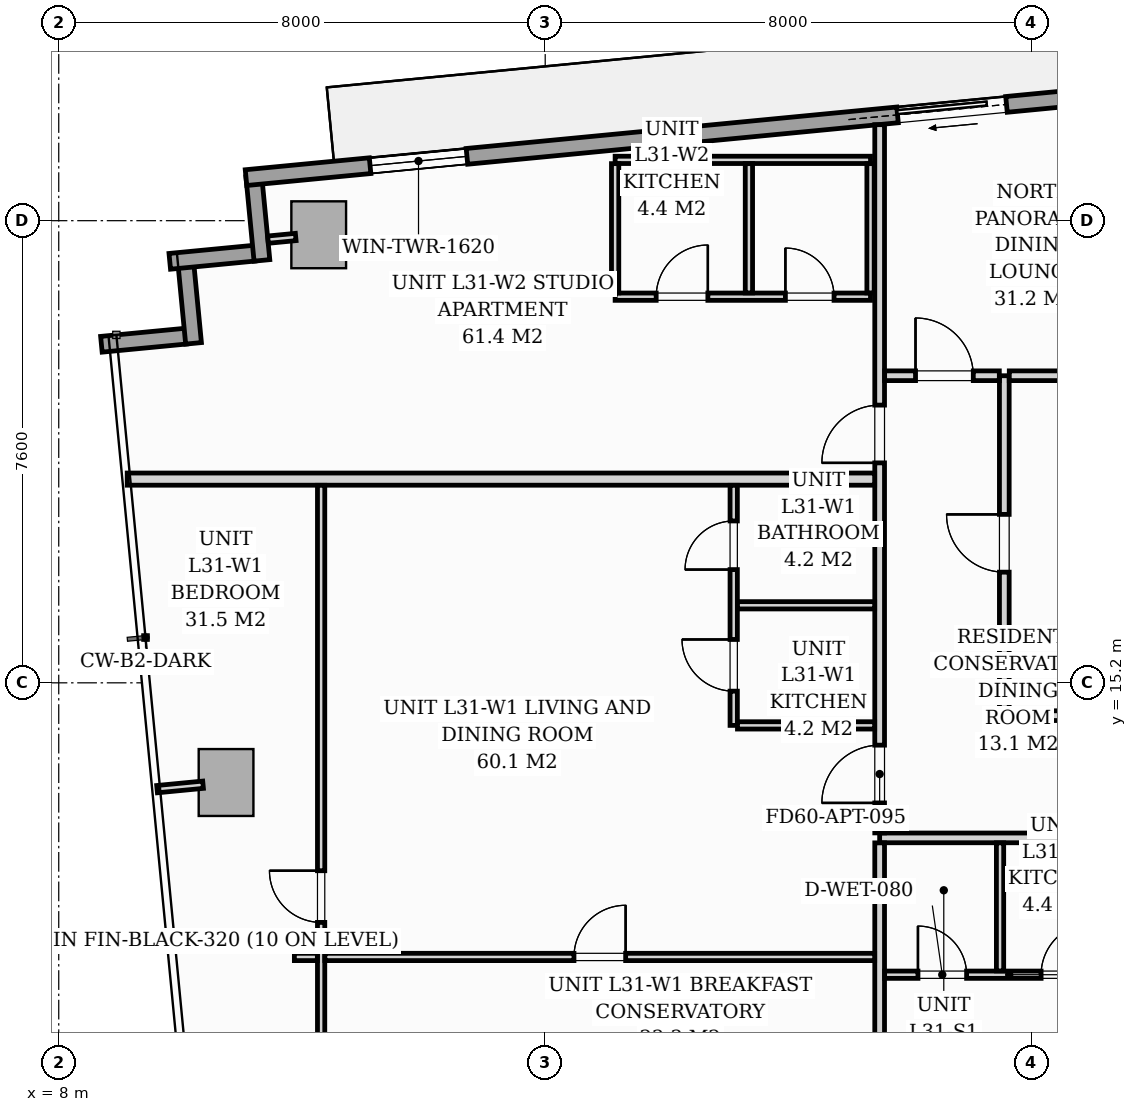
"""IFC4 building model, lengths in metres.
Left out: names, types, materials, properties, quantities, classifications, styles, units other than length and angle.
Written with IfcOpenShell. Run it as: python <this file> out.ifc"""

import sys

from ifc_helpers import new_model, si_unit, direction, frame, frame_2d, origin, origin_2d, place, context, subcontext, project, spatial, rectangle, extrude, source, transform, mapped, element, fill, save


model = new_model("IFC4")
c1 = context("Model", 3, precision=1e-05, world=origin(), true_north=direction((0.0, 1.0)))
c2 = subcontext(c1, "Body", "Model", "MODEL_VIEW")
j1 = project(units=[si_unit("LENGTHUNIT", "METRE"), si_unit("PLANEANGLEUNIT", "RADIAN")], contexts=[c1])
p1 = place(None, origin())
s1 = spatial("IfcSite", under=j1, at=p1, CompositionType="ELEMENT")
p2 = place(p1, origin())
s2 = spatial("IfcBuilding", under=s1, at=p2, CompositionType="ELEMENT")
p3 = place(p2, frame((0.0, 0.0, 109.8)))
s3 = spatial("IfcBuildingStorey", under=s2, at=p3, CompositionType="ELEMENT", Elevation=109.8)
m1 = source(origin(), c2, "Body", "SweptSolid", [
    extrude(rectangle(XDim=0.9, YDim=1.1, at=origin_2d()), origin(), (0.0, 0.0, 1.0), 3.196),
])
for number, where, z_axis, x_axis in (
    (1, (12.275, 22.568, 0.002), (0.0, 0.0, 1.0), (0.995, 0.096, 0.0)),
    (2, (10.752, 13.561, 0.002), (0.0, 0.0, 1.0), (0.995, 0.096, 0.0)),
):
    element("IfcColumn", number, at=place(p3, frame(where, z_axis=z_axis, x_axis=x_axis)), inside=s3, PredefinedType="COLUMN", context=c2, shape_type="MappedRepresentation", body=[
        mapped(m1, transform((0.0, 0.0, 0.0), scale=1.0)),
    ])
for number, where, z_axis, x_axis in (
    (3, (8.701, 20.767, 0.0), (0.0, 0.0, 1.0), (0.995, 0.096, 0.0)),
    (4, (10.217, 20.783, 0.0), (0.0, 0.0, 1.0), (-0.096, 0.995, 0.0)),
):
    element("IfcWall", number, at=place(p3, frame(where, z_axis=z_axis, x_axis=x_axis)), inside=s3, PredefinedType="STANDARD", context=c2, shape_type="SweptSolid", body=[
        extrude(rectangle(XDim=1.395, YDim=0.26, at=frame_2d((0.698, 0.0))), origin(), (0.0, 0.0, 1.0), 2.94),
    ])
p4 = place(p3, frame((9.826, 22.131, 0.0), z_axis=(0.0, 0.0, 1.0), x_axis=(0.995389446633, 0.095915846097, 0.0)))
e5 = element("IfcWall", 5, at=p4, inside=s3, PredefinedType="STANDARD", context=c2, shape_type="SweptSolid", body=[
    extrude(rectangle(XDim=1.395, YDim=0.26, at=frame_2d((0.697, 0.0))), origin(), (0.0, 0.0, 1.0), 2.94),
])
p5 = place(p3, frame((11.341, 22.147, 0.0), z_axis=(0.0, 0.0, 1.0), x_axis=(-0.09589913835, 0.995391056452, 0.0)))
e6 = element("IfcWall", 6, at=p5, inside=s3, PredefinedType="STANDARD", context=c2, shape_type="SweptSolid", body=[
    extrude(rectangle(XDim=1.395, YDim=0.26, at=frame_2d((0.698, 0.0))), origin(), (0.0, 0.0, 1.0), 2.94),
])
p6 = place(p3, frame((11.08, 23.508, 0.0), z_axis=(0.0, 0.0, 1.0), x_axis=(0.995396638587, 0.095841180552, 0.0)))
e7 = element("IfcWall", 7, at=p6, inside=s3, PredefinedType="STANDARD", context=c2, shape_type="SweptSolid", body=[
    extrude(rectangle(XDim=19.11, YDim=0.26, at=frame_2d((9.555, 0.0))), origin(), (0.0, 0.0, 1.0), 2.94),
])
p7 = place(p6, frame((10.764, 0.0, 0.0)))
e8 = element("IfcOpeningElement", 8, at=p7, cuts=e7, PredefinedType="OPENING", context=c2, shape_type="SweptSolid", body=[
    extrude(rectangle(XDim=1.8, YDim=2.06, at=frame_2d((0.9, 1.03))), frame((0.0, 0.14, 0.0), z_axis=(0.0, -1.0, 0.0), x_axis=(1.0, 0.0, 0.0)), (0.0, 0.0, 1.0), 0.28),
])
p8 = place(p6, frame((2.05, 0.0, 0.65)))
e9 = element("IfcOpeningElement", 9, at=p8, cuts=e7, PredefinedType="OPENING", context=c2, shape_type="SweptSolid", body=[
    extrude(rectangle(XDim=1.6, YDim=1.5, at=frame_2d((0.8, 0.75))), frame((0.0, 0.14, 0.0), z_axis=(0.0, -1.0, 0.0), x_axis=(1.0, 0.0, 0.0)), (0.0, 0.0, 1.0), 0.28),
])
p9 = place(p3, frame((21.5, 12.65, 0.0), z_axis=(0.0, 0.0, 1.0), x_axis=(1.0, 0.0, 0.0)))
e10 = element("IfcWall", 10, at=p9, inside=s3, PredefinedType="PARTITIONING", context=c2, shape_type="SweptSolid", body=[
    extrude(rectangle(XDim=26.2, YDim=0.16, at=frame_2d((13.1, 0.0))), origin(), (0.0, 0.0, 1.0), 2.94),
])
p10 = place(p9, frame((5.927, 0.0, 0.0)))
e11 = element("IfcOpeningElement", 11, at=p10, cuts=e10, PredefinedType="OPENING", context=c2, shape_type="SweptSolid", body=[
    extrude(rectangle(XDim=0.95, YDim=2.06, at=frame_2d((0.475, 1.03))), frame((0.0, 0.09, 0.0), z_axis=(0.0, -1.0, 0.0), x_axis=(1.0, 0.0, 0.0)), (0.0, 0.0, 1.0), 0.18),
])
p11 = place(p9, frame((10.575, 0.0, 0.0)))
e12 = element("IfcOpeningElement", 12, at=p11, cuts=e10, PredefinedType="OPENING", context=c2, shape_type="SweptSolid", body=[
    extrude(rectangle(XDim=0.95, YDim=2.06, at=frame_2d((0.475, 1.03))), frame((0.0, 0.09, 0.0), z_axis=(0.0, -1.0, 0.0), x_axis=(1.0, 0.0, 0.0)), (0.0, 0.0, 1.0), 0.18),
])
p12 = place(p9, frame((19.322, 0.0, 0.0)))
e13 = element("IfcOpeningElement", 13, at=p12, cuts=e10, PredefinedType="OPENING", context=c2, shape_type="SweptSolid", body=[
    extrude(rectangle(XDim=0.95, YDim=2.06, at=frame_2d((0.475, 1.03))), frame((0.0, 0.09, 0.0), z_axis=(0.0, -1.0, 0.0), x_axis=(1.0, 0.0, 0.0)), (0.0, 0.0, 1.0), 0.18),
])
p13 = place(p3, frame((21.5, 4.812, 0.0), z_axis=(0.0, 0.0, 1.0), x_axis=(0.0, 1.0, 0.0)))
e14 = element("IfcWall", 14, at=p13, inside=s3, PredefinedType="PARTITIONING", context=c2, shape_type="SweptSolid", body=[
    extrude(rectangle(XDim=7.756, YDim=0.16, at=frame_2d((3.878, 0.0))), origin(), (0.0, 0.0, 1.0), 2.94),
])
p14 = place(p3, frame((21.5, 12.732, 0.0), z_axis=(0.0, 0.0, 1.0), x_axis=(0.0, 1.0, 0.0)))
e15 = element("IfcWall", 15, at=p14, inside=s3, PredefinedType="PARTITIONING", context=c2, shape_type="SweptSolid", body=[
    extrude(rectangle(XDim=11.647, YDim=0.16, at=frame_2d((5.823, 0.0))), origin(), (0.0, 0.0, 1.0), 2.94),
])
p15 = place(p14, frame((0.493, 0.0, 0.0)))
e16 = element("IfcOpeningElement", 16, at=p15, cuts=e15, PredefinedType="OPENING", context=c2, shape_type="SweptSolid", body=[
    extrude(rectangle(XDim=0.95, YDim=2.06, at=frame_2d((0.475, 1.03))), frame((0.0, 0.09, 0.0), z_axis=(0.0, -1.0, 0.0), x_axis=(1.0, 0.0, 0.0)), (0.0, 0.0, 1.0), 0.18),
])
p16 = place(p14, frame((6.085, 0.0, 0.0)))
e17 = element("IfcOpeningElement", 17, at=p16, cuts=e15, PredefinedType="OPENING", context=c2, shape_type="SweptSolid", body=[
    extrude(rectangle(XDim=0.95, YDim=2.06, at=frame_2d((0.475, 1.03))), frame((0.0, 0.09, 0.0), z_axis=(0.0, -1.0, 0.0), x_axis=(1.0, 0.0, 0.0)), (0.0, 0.0, 1.0), 0.18),
])
p17 = place(p3, frame((21.582, 10.4, 0.0), z_axis=(0.0, 0.0, 1.0), x_axis=(1.0, 0.0, 0.0)))
e18 = element("IfcWall", 18, at=p17, inside=s3, PredefinedType="PARTITIONING", context=c2, shape_type="SweptSolid", body=[
    extrude(rectangle(XDim=4.098, YDim=0.12, at=frame_2d((2.049, 0.0))), origin(), (0.0, 0.0, 1.0), 2.94),
])
p18 = place(p17, frame((0.548, 0.0, 0.0)))
e19 = element("IfcOpeningElement", 19, at=p18, cuts=e18, PredefinedType="OPENING", context=c2, shape_type="SweptSolid", body=[
    extrude(rectangle(XDim=0.8, YDim=2.02, at=frame_2d((0.4, 1.01))), frame((0.0, 0.07, 0.0), z_axis=(0.0, -1.0, 0.0), x_axis=(1.0, 0.0, 0.0)), (0.0, 0.0, 1.0), 0.14),
])
p19 = place(p17, frame((2.573, 0.0, 0.0)))
e20 = element("IfcOpeningElement", 20, at=p19, cuts=e18, PredefinedType="OPENING", context=c2, shape_type="SweptSolid", body=[
    extrude(rectangle(XDim=0.85, YDim=2.05, at=frame_2d((0.425, 1.025))), frame((0.0, 0.07, 0.0), z_axis=(0.0, -1.0, 0.0), x_axis=(1.0, 0.0, 0.0)), (0.0, 0.0, 1.0), 0.14),
])
p20 = place(p3, frame((23.48, 10.462, 0.0), z_axis=(0.0, 0.0, 1.0), x_axis=(0.0, 1.0, 0.0)))
e21 = element("IfcWall", 21, at=p20, inside=s3, PredefinedType="PARTITIONING", context=c2, shape_type="SweptSolid", body=[
    extrude(rectangle(XDim=2.106, YDim=0.12, at=frame_2d((1.053, 0.0))), origin(), (0.0, 0.0, 1.0), 2.94),
])
p21 = place(p3, frame((9.126, 18.55, 0.0), z_axis=(0.0, 0.0, 1.0), x_axis=(1.0, 0.0, 0.0)))
e22 = element("IfcWall", 22, at=p21, inside=s3, PredefinedType="PARTITIONING", context=c2, shape_type="SweptSolid", body=[
    extrude(rectangle(XDim=12.292, YDim=0.2, at=frame_2d((6.146, 0.0))), origin(), (0.0, 0.0, 1.0), 2.94),
])
p22 = place(p3, frame((19.1, 14.5, 0.0), z_axis=(0.0, 0.0, 1.0), x_axis=(0.0, 1.0, 0.0)))
e23 = element("IfcWall", 23, at=p22, inside=s3, PredefinedType="PARTITIONING", context=c2, shape_type="SweptSolid", body=[
    extrude(rectangle(XDim=3.948, YDim=0.12, at=frame_2d((1.974, 0.0))), origin(), (0.0, 0.0, 1.0), 2.94),
])
p23 = place(p22, frame((0.563, 0.0, 0.0)))
e24 = element("IfcOpeningElement", 24, at=p23, cuts=e23, PredefinedType="OPENING", context=c2, shape_type="SweptSolid", body=[
    extrude(rectangle(XDim=0.85, YDim=2.05, at=frame_2d((0.425, 1.025))), frame((0.0, 0.07, 0.0), z_axis=(0.0, -1.0, 0.0), x_axis=(1.0, 0.0, 0.0)), (0.0, 0.0, 1.0), 0.14),
])
p24 = place(p22, frame((2.562, 0.0, 0.0)))
e25 = element("IfcOpeningElement", 25, at=p24, cuts=e23, PredefinedType="OPENING", context=c2, shape_type="SweptSolid", body=[
    extrude(rectangle(XDim=0.8, YDim=2.02, at=frame_2d((0.4, 1.01))), frame((0.0, 0.07, 0.0), z_axis=(0.0, -1.0, 0.0), x_axis=(1.0, 0.0, 0.0)), (0.0, 0.0, 1.0), 0.14),
])
for number, where, z_axis, x_axis in (
    (26, (19.162, 16.475, 0.0), (0.0, 0.0, 1.0), (1.0, 0.0, 0.0)),
    (27, (19.162, 14.5, 0.0), (0.0, 0.0, 1.0), (1.0, 0.0, 0.0)),
):
    element("IfcWall", number, at=place(p3, frame(where, z_axis=z_axis, x_axis=x_axis)), inside=s3, PredefinedType="PARTITIONING", context=c2, shape_type="SweptSolid", body=[
        extrude(rectangle(XDim=2.256, YDim=0.12, at=frame_2d((1.128, 0.0))), origin(), (0.0, 0.0, 1.0), 2.94),
    ])
p25 = place(p3, frame((12.315, 5.184, 0.0), z_axis=(0.0, 0.0, 1.0), x_axis=(0.0, 1.0, 0.0)))
e28 = element("IfcWall", 28, at=p25, inside=s3, PredefinedType="PARTITIONING", context=c2, shape_type="SweptSolid", body=[
    extrude(rectangle(XDim=13.264, YDim=0.12, at=frame_2d((6.632, 0.0))), origin(), (0.0, 0.0, 1.0), 2.94),
])
p26 = place(p25, frame((6.076, 0.0, 0.0)))
e29 = element("IfcOpeningElement", 29, at=p26, cuts=e28, PredefinedType="OPENING", context=c2, shape_type="SweptSolid", body=[
    extrude(rectangle(XDim=0.85, YDim=2.05, at=frame_2d((0.425, 1.025))), frame((0.0, 0.07, 0.0), z_axis=(0.0, -1.0, 0.0), x_axis=(1.0, 0.0, 0.0)), (0.0, 0.0, 1.0), 0.14),
])
p27 = place(p3, frame((11.875, 10.692, 0.0), z_axis=(0.0, 0.0, 1.0), x_axis=(1.0, 0.0, 0.0)))
e30 = element("IfcWall", 30, at=p27, inside=s3, PredefinedType="PARTITIONING", context=c2, shape_type="SweptSolid", body=[
    extrude(rectangle(XDim=0.378, YDim=0.12, at=frame_2d((0.189, 0.0))), origin(), (0.0, 0.0, 1.0), 2.94),
])
p28 = place(p3, frame((12.377, 10.692, 0.0), z_axis=(0.0, 0.0, 1.0), x_axis=(1.0, 0.0, 0.0)))
e31 = element("IfcWall", 31, at=p28, inside=s3, PredefinedType="PARTITIONING", context=c2, shape_type="SweptSolid", body=[
    extrude(rectangle(XDim=9.041, YDim=0.12, at=frame_2d((4.521, 0.0))), origin(), (0.0, 0.0, 1.0), 2.94),
])
p29 = place(p28, frame((4.096, 0.0, 0.0)))
e32 = element("IfcOpeningElement", 32, at=p29, cuts=e31, PredefinedType="OPENING", context=c2, shape_type="SweptSolid", body=[
    extrude(rectangle(XDim=0.85, YDim=2.05, at=frame_2d((0.425, 1.025))), frame((0.0, 0.07, 0.0), z_axis=(0.0, -1.0, 0.0), x_axis=(1.0, 0.0, 0.0)), (0.0, 0.0, 1.0), 0.14),
])
p30 = place(p3, frame((17.15, 21.55, 0.0), z_axis=(0.0, 0.0, 1.0), x_axis=(1.0, 0.0, 0.0)))
e33 = element("IfcWall", 33, at=p30, inside=s3, PredefinedType="PARTITIONING", context=c2, shape_type="SweptSolid", body=[
    extrude(rectangle(XDim=4.2, YDim=0.12, at=frame_2d((2.1, 0.0))), origin(), (0.0, 0.0, 1.0), 2.94),
])
p31 = place(p30, frame((0.675, 0.0, 0.0)))
e34 = element("IfcOpeningElement", 34, at=p31, cuts=e33, PredefinedType="OPENING", context=c2, shape_type="SweptSolid", body=[
    extrude(rectangle(XDim=0.85, YDim=2.05, at=frame_2d((0.425, 1.025))), frame((0.0, 0.07, 0.0), z_axis=(0.0, -1.0, 0.0), x_axis=(1.0, 0.0, 0.0)), (0.0, 0.0, 1.0), 0.14),
])
p32 = place(p30, frame((2.8, 0.0, 0.0)))
e35 = element("IfcOpeningElement", 35, at=p32, cuts=e33, PredefinedType="OPENING", context=c2, shape_type="SweptSolid", body=[
    extrude(rectangle(XDim=0.8, YDim=2.02, at=frame_2d((0.4, 1.01))), frame((0.0, 0.07, 0.0), z_axis=(0.0, -1.0, 0.0), x_axis=(1.0, 0.0, 0.0)), (0.0, 0.0, 1.0), 0.14),
])
p33 = place(p3, frame((17.15, 23.8, 0.0), z_axis=(0.0, 0.0, 1.0), x_axis=(1.0, 0.0, 0.0)))
e36 = element("IfcWall", 36, at=p33, inside=s3, PredefinedType="PARTITIONING", context=c2, shape_type="SweptSolid", body=[
    extrude(rectangle(XDim=4.2, YDim=0.12, at=frame_2d((2.1, 0.0))), origin(), (0.0, 0.0, 1.0), 2.31),
])
for number, where, z_axis, x_axis in (
    (37, (17.15, 21.612, 0.0), (0.0, 0.0, 1.0), (0.0, 1.0, 0.0)),
    (38, (19.35, 21.612, 0.0), (0.0, 0.0, 1.0), (0.0, 1.0, 0.0)),
    (39, (21.35, 21.612, 0.0), (0.0, 0.0, 1.0), (0.0, 1.0, 0.0)),
):
    element("IfcWall", number, at=place(p3, frame(where, z_axis=z_axis, x_axis=x_axis)), inside=s3, PredefinedType="PARTITIONING", context=c2, shape_type="SweptSolid", body=[
        extrude(rectangle(XDim=2.126, YDim=0.12, at=frame_2d((1.063, 0.0))), origin(), (0.0, 0.0, 1.0), 2.94),
    ])
p34 = place(p3, frame((23.55, 14.66, 0.0), z_axis=(0.0, 0.0, 1.0), x_axis=(0.0, 1.0, 0.0)))
e40 = element("IfcWall", 40, at=p34, inside=s3, PredefinedType="PARTITIONING", context=c2, shape_type="SweptSolid", body=[
    extrude(rectangle(XDim=5.59, YDim=0.16, at=frame_2d((2.795, 0.0))), origin(), (0.0, 0.0, 1.0), 2.94),
])
p35 = place(p34, frame((2.36, 0.0, 0.0)))
e41 = element("IfcOpeningElement", 41, at=p35, cuts=e40, PredefinedType="OPENING", context=c2, shape_type="SweptSolid", body=[
    extrude(rectangle(XDim=0.95, YDim=2.06, at=frame_2d((0.475, 1.03))), frame((0.0, 0.09, 0.0), z_axis=(0.0, -1.0, 0.0), x_axis=(1.0, 0.0, 0.0)), (0.0, 0.0, 1.0), 0.18),
])
p36 = place(p3, frame((21.582, 20.25, 0.0), z_axis=(0.0, 0.0, 1.0), x_axis=(1.0, 0.0, 0.0)))
e42 = element("IfcWall", 42, at=p36, inside=s3, PredefinedType="PARTITIONING", context=c2, shape_type="SweptSolid", body=[
    extrude(rectangle(XDim=1.886, YDim=0.16, at=frame_2d((0.943, 0.0))), origin(), (0.0, 0.0, 1.0), 2.94),
])
p37 = place(p36, frame((0.508, 0.0, 0.0)))
e43 = element("IfcOpeningElement", 43, at=p37, cuts=e42, PredefinedType="OPENING", context=c2, shape_type="SweptSolid", body=[
    extrude(rectangle(XDim=0.95, YDim=2.06, at=frame_2d((0.475, 1.03))), frame((0.0, 0.09, 0.0), z_axis=(0.0, -1.0, 0.0), x_axis=(1.0, 0.0, 0.0)), (0.0, 0.0, 1.0), 0.18),
])
p38 = place(p3, frame((23.632, 20.25, 0.0), z_axis=(0.0, 0.0, 1.0), x_axis=(1.0, 0.0, 0.0)))
e44 = element("IfcWall", 44, at=p38, inside=s3, PredefinedType="PARTITIONING", context=c2, shape_type="SweptSolid", body=[
    extrude(rectangle(XDim=2.466, YDim=0.16, at=frame_2d((1.233, 0.0))), origin(), (0.0, 0.0, 1.0), 2.94),
])
p39 = place(p3, frame((23.632, 14.66, 0.0), z_axis=(0.0, 0.0, 1.0), x_axis=(1.0, 0.0, 0.0)))
e45 = element("IfcWall", 45, at=p39, inside=s3, PredefinedType="PARTITIONING", context=c2, shape_type="SweptSolid", body=[
    extrude(rectangle(XDim=2.406, YDim=0.16, at=frame_2d((1.203, 0.0))), origin(), (0.0, 0.0, 1.0), 2.94),
])
p40 = place(p3, frame((11.897, 22.532, 0.0), z_axis=(0.0, 0.0, 1.0), x_axis=(-0.995384576284, -0.09596637586, 0.0)))
e46 = element("IfcWall", 46, at=p40, inside=s3, PredefinedType="PARTITIONING", context=c2, shape_type="SweptSolid", body=[
    extrude(rectangle(XDim=0.458, YDim=0.12, at=frame_2d((0.229, 0.0))), origin(), (0.0, 0.0, 1.0), 2.94),
])
p41 = place(p3, frame((10.373, 13.524, 0.0), z_axis=(0.0, 0.0, 1.0), x_axis=(-0.995377786728, -0.096036772582, 0.0)))
e47 = element("IfcWall", 47, at=p41, inside=s3, PredefinedType="PARTITIONING", context=c2, shape_type="SweptSolid", body=[
    extrude(rectangle(XDim=0.76, YDim=0.12, at=frame_2d((0.38, 0.0))), origin(), (0.0, 0.0, 1.0), 2.94),
])
m2 = source(origin(), c2, "Body", "SweptSolid", [
    extrude(rectangle(XDim=1.8, YDim=2.06, at=frame_2d((0.9, 1.03))), frame((0.0, 0.025, 0.0), z_axis=(0.0, -1.0, 0.0), x_axis=(1.0, 0.0, 0.0)), (0.0, 0.0, 1.0), 0.05),
])
p42 = place(p7, origin())
e48 = element("IfcDoor", 48, at=p42, inside=s3, OperationType="SLIDING_TO_LEFT", PredefinedType="DOOR", context=c2, shape_type="MappedRepresentation", body=[
    mapped(m2, transform((0.0, 0.0, 0.0), scale=1.0)),
])
fill(e8, e48)
m3 = source(origin(), c2, "Body", "SweptSolid", [
    extrude(rectangle(XDim=1.6, YDim=1.5, at=frame_2d((0.8, 0.75))), frame((0.0, 0.03, 0.0), z_axis=(0.0, -1.0, 0.0), x_axis=(1.0, 0.0, 0.0)), (0.0, 0.0, 1.0), 0.06),
])
p43 = place(p8, origin())
e49 = element("IfcWindow", 49, at=p43, inside=s3, PartitioningType="SINGLE_PANEL", PredefinedType="WINDOW", context=c2, shape_type="MappedRepresentation", body=[
    mapped(m3, transform((0.0, 0.0, 0.0), scale=1.0)),
])
fill(e9, e49)
m4 = source(origin(), c2, "Body", "SweptSolid", [
    extrude(rectangle(XDim=0.8, YDim=2.02, at=frame_2d((0.4, 1.01))), frame((0.0, 0.025, 0.0), z_axis=(0.0, -1.0, 0.0), x_axis=(1.0, 0.0, 0.0)), (0.0, 0.0, 1.0), 0.05),
])
p44 = place(p18, origin())
e50 = element("IfcDoor", 50, at=p44, inside=s3, OperationType="SINGLE_SWING_LEFT", PredefinedType="DOOR", context=c2, shape_type="MappedRepresentation", body=[
    mapped(m4, transform((0.0, 0.0, 0.0), scale=1.0)),
])
fill(e19, e50)
m5 = source(origin(), c2, "Body", "SweptSolid", [
    extrude(rectangle(XDim=0.85, YDim=2.05, at=frame_2d((0.425, 1.025))), frame((0.0, 0.025, 0.0), z_axis=(0.0, -1.0, 0.0), x_axis=(1.0, 0.0, 0.0)), (0.0, 0.0, 1.0), 0.05),
])
p45 = place(p19, origin())
e51 = element("IfcDoor", 51, at=p45, inside=s3, OperationType="SINGLE_SWING_RIGHT", PredefinedType="DOOR", context=c2, shape_type="MappedRepresentation", body=[
    mapped(m5, transform((0.0, 0.0, 0.0), scale=1.0)),
])
fill(e20, e51)
m6 = source(origin(), c2, "Body", "SweptSolid", [
    extrude(rectangle(XDim=0.95, YDim=2.06, at=frame_2d((0.475, 1.03))), frame((0.0, 0.025, 0.0), z_axis=(0.0, -1.0, 0.0), x_axis=(1.0, 0.0, 0.0)), (0.0, 0.0, 1.0), 0.05),
])
p46 = place(p15, origin())
e52 = element("IfcDoor", 52, at=p46, inside=s3, OperationType="SINGLE_SWING_LEFT", PredefinedType="DOOR", context=c2, shape_type="MappedRepresentation", body=[
    mapped(m6, transform((0.0, 0.0, 0.0), scale=1.0)),
])
fill(e16, e52)
p47 = place(p23, origin())
e53 = element("IfcDoor", 53, at=p47, inside=s3, OperationType="SINGLE_SWING_RIGHT", PredefinedType="DOOR", context=c2, shape_type="MappedRepresentation", body=[
    mapped(m5, transform((0.0, 0.0, 0.0), scale=1.0)),
])
fill(e24, e53)
p48 = place(p24, origin())
e54 = element("IfcDoor", 54, at=p48, inside=s3, OperationType="SINGLE_SWING_LEFT", PredefinedType="DOOR", context=c2, shape_type="MappedRepresentation", body=[
    mapped(m4, transform((0.0, 0.0, 0.0), scale=1.0)),
])
fill(e25, e54)
p49 = place(p26, origin())
e55 = element("IfcDoor", 55, at=p49, inside=s3, OperationType="SINGLE_SWING_RIGHT", PredefinedType="DOOR", context=c2, shape_type="MappedRepresentation", body=[
    mapped(m5, transform((0.0, 0.0, 0.0), scale=1.0)),
])
fill(e29, e55)
p50 = place(p29, origin())
e56 = element("IfcDoor", 56, at=p50, inside=s3, OperationType="SINGLE_SWING_RIGHT", PredefinedType="DOOR", context=c2, shape_type="MappedRepresentation", body=[
    mapped(m5, transform((0.0, 0.0, 0.0), scale=1.0)),
])
fill(e32, e56)
p51 = place(p16, origin())
e57 = element("IfcDoor", 57, at=p51, inside=s3, OperationType="SINGLE_SWING_LEFT", PredefinedType="DOOR", context=c2, shape_type="MappedRepresentation", body=[
    mapped(m6, transform((0.0, 0.0, 0.0), scale=1.0)),
])
fill(e17, e57)
p52 = place(p31, origin())
e58 = element("IfcDoor", 58, at=p52, inside=s3, OperationType="SINGLE_SWING_RIGHT", PredefinedType="DOOR", context=c2, shape_type="MappedRepresentation", body=[
    mapped(m5, transform((0.0, 0.0, 0.0), scale=1.0)),
])
fill(e34, e58)
p53 = place(p32, origin())
e59 = element("IfcDoor", 59, at=p53, inside=s3, OperationType="SINGLE_SWING_LEFT", PredefinedType="DOOR", context=c2, shape_type="MappedRepresentation", body=[
    mapped(m4, transform((0.0, 0.0, 0.0), scale=1.0)),
])
fill(e35, e59)
p54 = place(p35, origin())
e60 = element("IfcDoor", 60, at=p54, inside=s3, OperationType="SINGLE_SWING_RIGHT", PredefinedType="DOOR", context=c2, shape_type="MappedRepresentation", body=[
    mapped(m6, transform((0.0, 0.0, 0.0), scale=1.0)),
])
fill(e41, e60)
p55 = place(p37, origin())
e61 = element("IfcDoor", 61, at=p55, inside=s3, OperationType="SINGLE_SWING_LEFT", PredefinedType="DOOR", context=c2, shape_type="MappedRepresentation", body=[
    mapped(m6, transform((0.0, 0.0, 0.0), scale=1.0)),
])
fill(e43, e61)
save(model, sys.argv[1])
